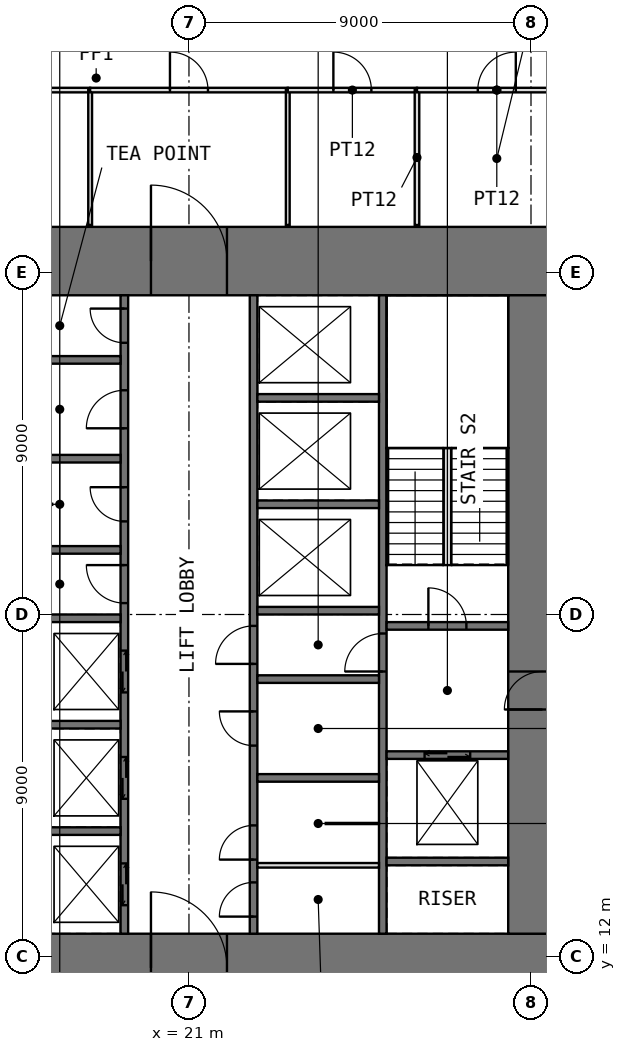
"""IFC4 building model, lengths in metres.
Left out: names, types, materials, properties, quantities, classifications, styles, units other than length and angle.
Written with IfcOpenShell. Run it as: python <this file> out.ifc"""

import sys

from ifc_helpers import new_model, si_unit, direction, frame, frame_2d, origin, place, context, subcontext, project, spatial, rectangle, extrude, element, fill, save


model = new_model("IFC4")
c1 = context("Model", 3, precision=1e-05, world=origin(), true_north=direction((0.0, 1.0)))
c2 = subcontext(c1, "Body", "Model", "MODEL_VIEW")
j1 = project(units=[si_unit("LENGTHUNIT", "METRE"), si_unit("PLANEANGLEUNIT", "RADIAN")], contexts=[c1])
p1 = place(None, origin())
s1 = spatial("IfcSite", under=j1, at=p1, CompositionType="ELEMENT")
p2 = place(p1, origin())
s2 = spatial("IfcBuilding", under=s1, at=p2, CompositionType="ELEMENT")
p3 = place(p2, frame((0.0, 0.0, 26.5)))
s3 = spatial("IfcBuildingStorey", under=s2, at=p3, CompositionType="ELEMENT", Elevation=26.5)
p4 = place(p3, frame((10.8, 11.7, -0.05), z_axis=(0.0, 0.0, 1.0), x_axis=(1.0, 0.0, 0.0)))
e1 = element("IfcWall", 1, at=p4, inside=s3, PredefinedType="SHEAR", context=c2, shape_type="SweptSolid", body=[
    extrude(rectangle(XDim=20.4, YDim=1.8, at=frame_2d((10.2, 0.0))), origin(), (0.0, 0.0, 1.0), 4.0),
])
p5 = place(p4, frame((9.2, 0.0, 0.05)))
e2 = element("IfcOpeningElement", 2, at=p5, cuts=e1, PredefinedType="OPENING", context=c2, shape_type="SweptSolid", body=[
    extrude(rectangle(XDim=2.0, YDim=2.2, at=frame_2d((1.0, 1.1))), frame((0.0, 0.91, 0.0), z_axis=(0.0, -1.0, 0.0), x_axis=(1.0, 0.0, 0.0)), (0.0, 0.0, 1.0), 1.82),
])
p6 = place(p3, frame((10.8, 30.3, -0.05), z_axis=(0.0, 0.0, 1.0), x_axis=(1.0, 0.0, 0.0)))
e3 = element("IfcWall", 3, at=p6, inside=s3, PredefinedType="SHEAR", context=c2, shape_type="SweptSolid", body=[
    extrude(rectangle(XDim=20.4, YDim=1.8, at=frame_2d((10.2, 0.0))), origin(), (0.0, 0.0, 1.0), 4.0),
])
p7 = place(p6, frame((9.2, 0.0, 0.05)))
e4 = element("IfcOpeningElement", 4, at=p7, cuts=e3, PredefinedType="OPENING", context=c2, shape_type="SweptSolid", body=[
    extrude(rectangle(XDim=2.0, YDim=2.2, at=frame_2d((1.0, 1.1))), frame((0.0, 0.91, 0.0), z_axis=(0.0, -1.0, 0.0), x_axis=(1.0, 0.0, 0.0)), (0.0, 0.0, 1.0), 1.82),
])
p8 = place(p3, frame((30.3, 12.6, -0.05), z_axis=(0.0, 0.0, 1.0), x_axis=(0.0, 1.0, 0.0)))
e5 = element("IfcWall", 5, at=p8, inside=s3, PredefinedType="SHEAR", context=c2, shape_type="SweptSolid", body=[
    extrude(rectangle(XDim=16.8, YDim=1.8, at=frame_2d((8.4, 0.0))), origin(), (0.0, 0.0, 1.0), 4.0),
])
p9 = place(p8, frame((5.9, 0.0, 0.05)))
e6 = element("IfcOpeningElement", 6, at=p9, cuts=e5, PredefinedType="OPENING", context=c2, shape_type="SweptSolid", body=[
    extrude(rectangle(XDim=1.0, YDim=2.2, at=frame_2d((0.5, 1.1))), frame((0.0, 0.91, 0.0), z_axis=(0.0, -1.0, 0.0), x_axis=(1.0, 0.0, 0.0)), (0.0, 0.0, 1.0), 1.82),
])
p10 = place(p3, frame((19.3, 12.6, -0.05), z_axis=(0.0, 0.0, 1.0), x_axis=(0.0, 1.0, 0.0)))
e7 = element("IfcWall", 7, at=p10, inside=s3, PredefinedType="SHEAR", context=c2, shape_type="SweptSolid", body=[
    extrude(rectangle(XDim=16.8, YDim=0.2, at=frame_2d((8.4, 0.0))), origin(), (0.0, 0.0, 1.0), 4.0),
])
p11 = place(p10, frame((8.7, 0.0, 0.05)))
e8 = element("IfcOpeningElement", 8, at=p11, cuts=e7, PredefinedType="OPENING", context=c2, shape_type="SweptSolid", body=[
    extrude(rectangle(XDim=1.0, YDim=2.2, at=frame_2d((0.5, 1.1))), frame((0.0, 0.11, 0.0), z_axis=(0.0, -1.0, 0.0), x_axis=(1.0, 0.0, 0.0)), (0.0, 0.0, 1.0), 0.22),
])
p12 = place(p10, frame((10.85, 0.0, 0.05)))
e9 = element("IfcOpeningElement", 9, at=p12, cuts=e7, PredefinedType="OPENING", context=c2, shape_type="SweptSolid", body=[
    extrude(rectangle(XDim=0.9, YDim=2.2, at=frame_2d((0.45, 1.1))), frame((0.0, 0.11, 0.0), z_axis=(0.0, -1.0, 0.0), x_axis=(1.0, 0.0, 0.0)), (0.0, 0.0, 1.0), 0.22),
])
p13 = place(p10, frame((13.3, 0.0, 0.05)))
e10 = element("IfcOpeningElement", 10, at=p13, cuts=e7, PredefinedType="OPENING", context=c2, shape_type="SweptSolid", body=[
    extrude(rectangle(XDim=1.0, YDim=2.2, at=frame_2d((0.5, 1.1))), frame((0.0, 0.11, 0.0), z_axis=(0.0, -1.0, 0.0), x_axis=(1.0, 0.0, 0.0)), (0.0, 0.0, 1.0), 0.22),
])
p14 = place(p10, frame((15.55, 0.0, 0.05)))
e11 = element("IfcOpeningElement", 11, at=p14, cuts=e7, PredefinedType="OPENING", context=c2, shape_type="SweptSolid", body=[
    extrude(rectangle(XDim=0.9, YDim=2.2, at=frame_2d((0.45, 1.1))), frame((0.0, 0.11, 0.0), z_axis=(0.0, -1.0, 0.0), x_axis=(1.0, 0.0, 0.0)), (0.0, 0.0, 1.0), 0.22),
])
p15 = place(p10, frame((0.75, 0.0, 0.05)))
e12 = element("IfcOpeningElement", 12, at=p15, cuts=e7, PredefinedType="OPENING", context=c2, shape_type="SweptSolid", body=[
    extrude(rectangle(XDim=1.1, YDim=2.2, at=frame_2d((0.55, 1.1))), frame((0.0, 0.11, 0.0), z_axis=(0.0, -1.0, 0.0), x_axis=(1.0, 0.0, 0.0)), (0.0, 0.0, 1.0), 0.22),
])
p16 = place(p10, frame((3.55, 0.0, 0.05)))
e13 = element("IfcOpeningElement", 13, at=p16, cuts=e7, PredefinedType="OPENING", context=c2, shape_type="SweptSolid", body=[
    extrude(rectangle(XDim=1.1, YDim=2.2, at=frame_2d((0.55, 1.1))), frame((0.0, 0.11, 0.0), z_axis=(0.0, -1.0, 0.0), x_axis=(1.0, 0.0, 0.0)), (0.0, 0.0, 1.0), 0.22),
])
p17 = place(p10, frame((6.35, 0.0, 0.05)))
e14 = element("IfcOpeningElement", 14, at=p17, cuts=e7, PredefinedType="OPENING", context=c2, shape_type="SweptSolid", body=[
    extrude(rectangle(XDim=1.1, YDim=2.2, at=frame_2d((0.55, 1.1))), frame((0.0, 0.11, 0.0), z_axis=(0.0, -1.0, 0.0), x_axis=(1.0, 0.0, 0.0)), (0.0, 0.0, 1.0), 0.22),
])
p18 = place(p3, frame((22.7, 12.6, -0.05), z_axis=(0.0, 0.0, 1.0), x_axis=(0.0, 1.0, 0.0)))
e15 = element("IfcWall", 15, at=p18, inside=s3, PredefinedType="SHEAR", context=c2, shape_type="SweptSolid", body=[
    extrude(rectangle(XDim=16.8, YDim=0.2, at=frame_2d((8.4, 0.0))), origin(), (0.0, 0.0, 1.0), 4.0),
])
p19 = place(p18, frame((0.45, 0.0, 0.05)))
e16 = element("IfcOpeningElement", 16, at=p19, cuts=e15, PredefinedType="OPENING", context=c2, shape_type="SweptSolid", body=[
    extrude(rectangle(XDim=0.9, YDim=2.2, at=frame_2d((0.45, 1.1))), frame((0.0, 0.11, 0.0), z_axis=(0.0, -1.0, 0.0), x_axis=(1.0, 0.0, 0.0)), (0.0, 0.0, 1.0), 0.22),
])
p20 = place(p18, frame((7.1, 0.0, 0.05)))
e17 = element("IfcOpeningElement", 17, at=p20, cuts=e15, PredefinedType="OPENING", context=c2, shape_type="SweptSolid", body=[
    extrude(rectangle(XDim=1.0, YDim=2.2, at=frame_2d((0.5, 1.1))), frame((0.0, 0.11, 0.0), z_axis=(0.0, -1.0, 0.0), x_axis=(1.0, 0.0, 0.0)), (0.0, 0.0, 1.0), 0.22),
])
p21 = place(p18, frame((1.95, 0.0, 0.05)))
e18 = element("IfcOpeningElement", 18, at=p21, cuts=e15, PredefinedType="OPENING", context=c2, shape_type="SweptSolid", body=[
    extrude(rectangle(XDim=0.9, YDim=2.2, at=frame_2d((0.45, 1.1))), frame((0.0, 0.11, 0.0), z_axis=(0.0, -1.0, 0.0), x_axis=(1.0, 0.0, 0.0)), (0.0, 0.0, 1.0), 0.22),
])
p22 = place(p18, frame((4.95, 0.0, 0.05)))
e19 = element("IfcOpeningElement", 19, at=p22, cuts=e15, PredefinedType="OPENING", context=c2, shape_type="SweptSolid", body=[
    extrude(rectangle(XDim=0.9, YDim=2.2, at=frame_2d((0.45, 1.1))), frame((0.0, 0.11, 0.0), z_axis=(0.0, -1.0, 0.0), x_axis=(1.0, 0.0, 0.0)), (0.0, 0.0, 1.0), 0.22),
])
p23 = place(p3, frame((26.1, 12.6, -0.05), z_axis=(0.0, 0.0, 1.0), x_axis=(0.0, 1.0, 0.0)))
e20 = element("IfcWall", 20, at=p23, inside=s3, PredefinedType="SHEAR", context=c2, shape_type="SweptSolid", body=[
    extrude(rectangle(XDim=16.8, YDim=0.2, at=frame_2d((8.4, 0.0))), origin(), (0.0, 0.0, 1.0), 4.0),
])
p24 = place(p23, frame((6.9, 0.0, 0.05)))
e21 = element("IfcOpeningElement", 21, at=p24, cuts=e20, PredefinedType="OPENING", context=c2, shape_type="SweptSolid", body=[
    extrude(rectangle(XDim=1.0, YDim=2.2, at=frame_2d((0.5, 1.1))), frame((0.0, 0.11, 0.0), z_axis=(0.0, -1.0, 0.0), x_axis=(1.0, 0.0, 0.0)), (0.0, 0.0, 1.0), 0.22),
])
for number, where, z_axis, x_axis in (
    (22, (16.0, 15.3, -0.05), (0.0, 0.0, 1.0), (1.0, 0.0, 0.0)),
    (23, (16.0, 18.1, -0.05), (0.0, 0.0, 1.0), (1.0, 0.0, 0.0)),
    (24, (16.0, 20.9, -0.05), (0.0, 0.0, 1.0), (1.0, 0.0, 0.0)),
    (25, (16.0, 22.7, -0.05), (0.0, 0.0, 1.0), (1.0, 0.0, 0.0)),
    (26, (16.0, 25.1, -0.05), (0.0, 0.0, 1.0), (1.0, 0.0, 0.0)),
    (27, (16.0, 27.7, -0.05), (0.0, 0.0, 1.0), (1.0, 0.0, 0.0)),
    (28, (22.8, 16.7, -0.05), (0.0, 0.0, 1.0), (1.0, 0.0, 0.0)),
    (29, (22.8, 19.3, -0.05), (0.0, 0.0, 1.0), (1.0, 0.0, 0.0)),
    (30, (22.8, 21.1, -0.05), (0.0, 0.0, 1.0), (1.0, 0.0, 0.0)),
    (31, (22.8, 23.9, -0.05), (0.0, 0.0, 1.0), (1.0, 0.0, 0.0)),
    (32, (22.8, 26.7, -0.05), (0.0, 0.0, 1.0), (1.0, 0.0, 0.0)),
    (33, (26.2, 14.5, -0.05), (0.0, 0.0, 1.0), (1.0, 0.0, 0.0)),
):
    element("IfcWall", number, at=place(p3, frame(where, z_axis=z_axis, x_axis=x_axis)), inside=s3, PredefinedType="SHEAR", context=c2, shape_type="SweptSolid", body=[
        extrude(rectangle(XDim=3.2, YDim=0.2, at=frame_2d((1.6, 0.0))), origin(), (0.0, 0.0, 1.0), 4.0),
    ])
p25 = place(p3, frame((26.2, 17.3, -0.05), z_axis=(0.0, 0.0, 1.0), x_axis=(1.0, 0.0, 0.0)))
e34 = element("IfcWall", 34, at=p25, inside=s3, PredefinedType="SHEAR", context=c2, shape_type="SweptSolid", body=[
    extrude(rectangle(XDim=3.2, YDim=0.2, at=frame_2d((1.6, 0.0))), origin(), (0.0, 0.0, 1.0), 4.0),
])
p26 = place(p25, frame((1.0, 0.0, 0.05)))
e35 = element("IfcOpeningElement", 35, at=p26, cuts=e34, PredefinedType="OPENING", context=c2, shape_type="SweptSolid", body=[
    extrude(rectangle(XDim=1.2, YDim=2.2, at=frame_2d((0.6, 1.1))), frame((0.0, 0.11, 0.0), z_axis=(0.0, -1.0, 0.0), x_axis=(1.0, 0.0, 0.0)), (0.0, 0.0, 1.0), 0.22),
])
p27 = place(p3, frame((26.2, 20.7, -0.05), z_axis=(0.0, 0.0, 1.0), x_axis=(1.0, 0.0, 0.0)))
e36 = element("IfcWall", 36, at=p27, inside=s3, PredefinedType="SHEAR", context=c2, shape_type="SweptSolid", body=[
    extrude(rectangle(XDim=3.2, YDim=0.2, at=frame_2d((1.6, 0.0))), origin(), (0.0, 0.0, 1.0), 4.0),
])
p28 = place(p27, frame((1.1, 0.0, 0.05)))
e37 = element("IfcOpeningElement", 37, at=p28, cuts=e36, PredefinedType="OPENING", context=c2, shape_type="SweptSolid", body=[
    extrude(rectangle(XDim=1.0, YDim=2.2, at=frame_2d((0.5, 1.1))), frame((0.0, 0.11, 0.0), z_axis=(0.0, -1.0, 0.0), x_axis=(1.0, 0.0, 0.0)), (0.0, 0.0, 1.0), 0.22),
])
p29 = place(p3, frame((22.8, 14.4, 0.0), z_axis=(0.0, 0.0, 1.0), x_axis=(1.0, 0.0, 0.0)))
e38 = element("IfcWall", 38, at=p29, inside=s3, PredefinedType="PARTITIONING", context=c2, shape_type="SweptSolid", body=[
    extrude(rectangle(XDim=3.2, YDim=0.12, at=frame_2d((1.6, 0.0))), origin(), (0.0, 0.0, 1.0), 3.75),
])
p30 = place(p3, frame((24.6, 15.5, 0.0), z_axis=(0.0, 0.0, 1.0), x_axis=(1.0, 0.0, 0.0)))
e39 = element("IfcWall", 39, at=p30, inside=s3, PredefinedType="PARTITIONING", context=c2, shape_type="SweptSolid", body=[
    extrude(rectangle(XDim=1.4, YDim=0.03, at=frame_2d((0.7, 0.0))), origin(), (0.0, 0.0, 1.0), 3.75),
])
p31 = place(p3, frame((14.6, 34.8, 0.0), z_axis=(0.0, 0.0, 1.0), x_axis=(1.0, 0.0, 0.0)))
e40 = element("IfcWall", 40, at=p31, inside=s3, PredefinedType="PARTITIONING", context=c2, shape_type="SweptSolid", body=[
    extrude(rectangle(XDim=3.8, YDim=0.12, at=frame_2d((1.9, 0.0))), origin(), (0.0, 0.0, 1.0), 3.75),
])
p32 = place(p31, frame((1.4, 0.0, 0.0)))
e41 = element("IfcOpeningElement", 41, at=p32, cuts=e40, PredefinedType="OPENING", context=c2, shape_type="SweptSolid", body=[
    extrude(rectangle(XDim=1.0, YDim=2.4, at=frame_2d((0.5, 1.2))), frame((0.0, 0.07, 0.0), z_axis=(0.0, -1.0, 0.0), x_axis=(1.0, 0.0, 0.0)), (0.0, 0.0, 1.0), 0.14),
])
p33 = place(p3, frame((18.4, 31.25, 0.0), z_axis=(0.0, 0.0, 1.0), x_axis=(0.0, 1.0, 0.0)))
e42 = element("IfcWall", 42, at=p33, inside=s3, PredefinedType="PARTITIONING", context=c2, shape_type="SweptSolid", body=[
    extrude(rectangle(XDim=3.55, YDim=0.1, at=frame_2d((1.775, 0.0))), origin(), (0.0, 0.0, 1.0), 3.75),
])
p34 = place(p3, frame((18.4, 34.8, 0.0), z_axis=(0.0, 0.0, 1.0), x_axis=(1.0, 0.0, 0.0)))
e43 = element("IfcWall", 43, at=p34, inside=s3, PredefinedType="PARTITIONING", context=c2, shape_type="SweptSolid", body=[
    extrude(rectangle(XDim=5.2, YDim=0.12, at=frame_2d((2.6, 0.0))), origin(), (0.0, 0.0, 1.0), 3.75),
])
p35 = place(p34, frame((2.1, 0.0, 0.0)))
e44 = element("IfcOpeningElement", 44, at=p35, cuts=e43, PredefinedType="OPENING", context=c2, shape_type="SweptSolid", body=[
    extrude(rectangle(XDim=1.0, YDim=2.4, at=frame_2d((0.5, 1.2))), frame((0.0, 0.07, 0.0), z_axis=(0.0, -1.0, 0.0), x_axis=(1.0, 0.0, 0.0)), (0.0, 0.0, 1.0), 0.14),
])
p36 = place(p3, frame((23.6, 31.25, 0.0), z_axis=(0.0, 0.0, 1.0), x_axis=(0.0, 1.0, 0.0)))
e45 = element("IfcWall", 45, at=p36, inside=s3, PredefinedType="PARTITIONING", context=c2, shape_type="SweptSolid", body=[
    extrude(rectangle(XDim=3.55, YDim=0.1, at=frame_2d((1.775, 0.0))), origin(), (0.0, 0.0, 1.0), 3.75),
])
p37 = place(p3, frame((23.6, 34.8, 0.0), z_axis=(0.0, 0.0, 1.0), x_axis=(1.0, 0.0, 0.0)))
e46 = element("IfcWall", 46, at=p37, inside=s3, PredefinedType="PARTITIONING", context=c2, shape_type="SweptSolid", body=[
    extrude(rectangle(XDim=3.4, YDim=0.12, at=frame_2d((1.7, 0.0))), origin(), (0.0, 0.0, 1.0), 3.75),
])
p38 = place(p37, frame((1.2, 0.0, 0.0)))
e47 = element("IfcOpeningElement", 47, at=p38, cuts=e46, PredefinedType="OPENING", context=c2, shape_type="SweptSolid", body=[
    extrude(rectangle(XDim=1.0, YDim=2.4, at=frame_2d((0.5, 1.2))), frame((0.0, 0.07, 0.0), z_axis=(0.0, -1.0, 0.0), x_axis=(1.0, 0.0, 0.0)), (0.0, 0.0, 1.0), 0.14),
])
p39 = place(p3, frame((27.0, 31.25, 0.0), z_axis=(0.0, 0.0, 1.0), x_axis=(0.0, 1.0, 0.0)))
e48 = element("IfcWall", 48, at=p39, inside=s3, PredefinedType="PARTITIONING", context=c2, shape_type="SweptSolid", body=[
    extrude(rectangle(XDim=3.55, YDim=0.12, at=frame_2d((1.775, 0.0))), origin(), (0.0, 0.0, 1.0), 3.75),
])
p40 = place(p3, frame((27.0, 34.8, 0.0), z_axis=(0.0, 0.0, 1.0), x_axis=(1.0, 0.0, 0.0)))
e49 = element("IfcWall", 49, at=p40, inside=s3, PredefinedType="PARTITIONING", context=c2, shape_type="SweptSolid", body=[
    extrude(rectangle(XDim=4.2, YDim=0.12, at=frame_2d((2.1, 0.0))), origin(), (0.0, 0.0, 1.0), 3.75),
])
p41 = place(p40, frame((1.6, 0.0, 0.0)))
e50 = element("IfcOpeningElement", 50, at=p41, cuts=e49, PredefinedType="OPENING", context=c2, shape_type="SweptSolid", body=[
    extrude(rectangle(XDim=1.0, YDim=2.4, at=frame_2d((0.5, 1.2))), frame((0.0, 0.07, 0.0), z_axis=(0.0, -1.0, 0.0), x_axis=(1.0, 0.0, 0.0)), (0.0, 0.0, 1.0), 0.14),
])
p42 = place(p3, frame((27.8, 22.3, 0.0), z_axis=(0.0, 0.0, 1.0), x_axis=(0.0, 1.0, 0.0)))
e51 = element("IfcWall", 51, at=p42, inside=s3, PredefinedType="PARTITIONING", context=c2, shape_type="SweptSolid", body=[
    extrude(rectangle(XDim=3.08, YDim=0.2, at=frame_2d((1.54, 0.0))), origin(), (0.0, 0.0, 1.0), 4.0),
])
p43 = place(p5, origin())
e52 = element("IfcDoor", 52, at=p43, inside=s3, OperationType="DOUBLE_DOOR_SINGLE_SWING", PredefinedType="DOOR", context=c2, shape_type="SweptSolid", body=[
    extrude(rectangle(XDim=2.0, YDim=2.2, at=frame_2d((1.0, 1.1))), frame((0.0, 0.025, 0.0), z_axis=(0.0, -1.0, 0.0), x_axis=(1.0, 0.0, 0.0)), (0.0, 0.0, 1.0), 0.05),
])
fill(e2, e52)
p44 = place(p7, origin())
e53 = element("IfcDoor", 53, at=p44, inside=s3, OperationType="DOUBLE_DOOR_SINGLE_SWING", PredefinedType="DOOR", context=c2, shape_type="SweptSolid", body=[
    extrude(rectangle(XDim=2.0, YDim=2.2, at=frame_2d((1.0, 1.1))), frame((0.0, 0.025, 0.0), z_axis=(0.0, -1.0, 0.0), x_axis=(1.0, 0.0, 0.0)), (0.0, 0.0, 1.0), 0.05),
])
fill(e4, e53)
p45 = place(p19, origin())
e54 = element("IfcDoor", 54, at=p45, inside=s3, OperationType="SINGLE_SWING_LEFT", PredefinedType="DOOR", context=c2, shape_type="SweptSolid", body=[
    extrude(rectangle(XDim=0.9, YDim=2.2, at=frame_2d((0.45, 1.1))), frame((0.0, 0.025, 0.0), z_axis=(0.0, -1.0, 0.0), x_axis=(1.0, 0.0, 0.0)), (0.0, 0.0, 1.0), 0.05),
])
fill(e16, e54)
p46 = place(p9, origin())
e55 = element("IfcDoor", 55, at=p46, inside=s3, OperationType="SINGLE_SWING_LEFT", PredefinedType="DOOR", context=c2, shape_type="SweptSolid", body=[
    extrude(rectangle(XDim=1.0, YDim=2.2, at=frame_2d((0.5, 1.1))), frame((0.0, 0.025, 0.0), z_axis=(0.0, -1.0, 0.0), x_axis=(1.0, 0.0, 0.0)), (0.0, 0.0, 1.0), 0.05),
])
fill(e6, e55)
p47 = place(p28, origin())
e56 = element("IfcDoor", 56, at=p47, inside=s3, OperationType="SINGLE_SWING_LEFT", PredefinedType="DOOR", context=c2, shape_type="SweptSolid", body=[
    extrude(rectangle(XDim=1.0, YDim=2.2, at=frame_2d((0.5, 1.1))), frame((0.0, 0.025, 0.0), z_axis=(0.0, -1.0, 0.0), x_axis=(1.0, 0.0, 0.0)), (0.0, 0.0, 1.0), 0.05),
])
fill(e37, e56)
p48 = place(p24, origin())
e57 = element("IfcDoor", 57, at=p48, inside=s3, OperationType="SINGLE_SWING_LEFT", PredefinedType="DOOR", context=c2, shape_type="SweptSolid", body=[
    extrude(rectangle(XDim=1.0, YDim=2.2, at=frame_2d((0.5, 1.1))), frame((0.0, 0.025, 0.0), z_axis=(0.0, -1.0, 0.0), x_axis=(1.0, 0.0, 0.0)), (0.0, 0.0, 1.0), 0.05),
])
fill(e21, e57)
p49 = place(p11, origin())
e58 = element("IfcDoor", 58, at=p49, inside=s3, OperationType="SINGLE_SWING_RIGHT", PredefinedType="DOOR", context=c2, shape_type="SweptSolid", body=[
    extrude(rectangle(XDim=1.0, YDim=2.2, at=frame_2d((0.5, 1.1))), frame((0.0, 0.025, 0.0), z_axis=(0.0, -1.0, 0.0), x_axis=(1.0, 0.0, 0.0)), (0.0, 0.0, 1.0), 0.05),
])
fill(e8, e58)
p50 = place(p20, origin())
e59 = element("IfcDoor", 59, at=p50, inside=s3, OperationType="SINGLE_SWING_LEFT", PredefinedType="DOOR", context=c2, shape_type="SweptSolid", body=[
    extrude(rectangle(XDim=1.0, YDim=2.2, at=frame_2d((0.5, 1.1))), frame((0.0, 0.025, 0.0), z_axis=(0.0, -1.0, 0.0), x_axis=(1.0, 0.0, 0.0)), (0.0, 0.0, 1.0), 0.05),
])
fill(e17, e59)
p51 = place(p12, origin())
e60 = element("IfcDoor", 60, at=p51, inside=s3, OperationType="SINGLE_SWING_RIGHT", PredefinedType="DOOR", context=c2, shape_type="SweptSolid", body=[
    extrude(rectangle(XDim=0.9, YDim=2.2, at=frame_2d((0.45, 1.1))), frame((0.0, 0.025, 0.0), z_axis=(0.0, -1.0, 0.0), x_axis=(1.0, 0.0, 0.0)), (0.0, 0.0, 1.0), 0.05),
])
fill(e9, e60)
p52 = place(p13, origin())
e61 = element("IfcDoor", 61, at=p52, inside=s3, OperationType="SINGLE_SWING_LEFT", PredefinedType="DOOR", context=c2, shape_type="SweptSolid", body=[
    extrude(rectangle(XDim=1.0, YDim=2.2, at=frame_2d((0.5, 1.1))), frame((0.0, 0.025, 0.0), z_axis=(0.0, -1.0, 0.0), x_axis=(1.0, 0.0, 0.0)), (0.0, 0.0, 1.0), 0.05),
])
fill(e10, e61)
p53 = place(p14, origin())
e62 = element("IfcDoor", 62, at=p53, inside=s3, OperationType="SINGLE_SWING_RIGHT", PredefinedType="DOOR", context=c2, shape_type="SweptSolid", body=[
    extrude(rectangle(XDim=0.9, YDim=2.2, at=frame_2d((0.45, 1.1))), frame((0.0, 0.025, 0.0), z_axis=(0.0, -1.0, 0.0), x_axis=(1.0, 0.0, 0.0)), (0.0, 0.0, 1.0), 0.05),
])
fill(e11, e62)
p54 = place(p21, origin())
e63 = element("IfcDoor", 63, at=p54, inside=s3, OperationType="SINGLE_SWING_LEFT", PredefinedType="DOOR", context=c2, shape_type="SweptSolid", body=[
    extrude(rectangle(XDim=0.9, YDim=2.2, at=frame_2d((0.45, 1.1))), frame((0.0, 0.025, 0.0), z_axis=(0.0, -1.0, 0.0), x_axis=(1.0, 0.0, 0.0)), (0.0, 0.0, 1.0), 0.05),
])
fill(e18, e63)
p55 = place(p22, origin())
e64 = element("IfcDoor", 64, at=p55, inside=s3, OperationType="SINGLE_SWING_RIGHT", PredefinedType="DOOR", context=c2, shape_type="SweptSolid", body=[
    extrude(rectangle(XDim=0.9, YDim=2.2, at=frame_2d((0.45, 1.1))), frame((0.0, 0.025, 0.0), z_axis=(0.0, -1.0, 0.0), x_axis=(1.0, 0.0, 0.0)), (0.0, 0.0, 1.0), 0.05),
])
fill(e19, e64)
p56 = place(p38, origin())
e65 = element("IfcDoor", 65, at=p56, inside=s3, OperationType="SINGLE_SWING_LEFT", PredefinedType="DOOR", context=c2, shape_type="SweptSolid", body=[
    extrude(rectangle(XDim=1.0, YDim=2.4, at=frame_2d((0.5, 1.2))), frame((0.0, 0.025, 0.0), z_axis=(0.0, -1.0, 0.0), x_axis=(1.0, 0.0, 0.0)), (0.0, 0.0, 1.0), 0.05),
])
fill(e47, e65)
p57 = place(p41, origin())
e66 = element("IfcDoor", 66, at=p57, inside=s3, OperationType="SINGLE_SWING_RIGHT", PredefinedType="DOOR", context=c2, shape_type="SweptSolid", body=[
    extrude(rectangle(XDim=1.0, YDim=2.4, at=frame_2d((0.5, 1.2))), frame((0.0, 0.025, 0.0), z_axis=(0.0, -1.0, 0.0), x_axis=(1.0, 0.0, 0.0)), (0.0, 0.0, 1.0), 0.05),
])
fill(e50, e66)
p58 = place(p35, origin())
e67 = element("IfcDoor", 67, at=p58, inside=s3, OperationType="SINGLE_SWING_LEFT", PredefinedType="DOOR", context=c2, shape_type="SweptSolid", body=[
    extrude(rectangle(XDim=1.0, YDim=2.4, at=frame_2d((0.5, 1.2))), frame((0.0, 0.025, 0.0), z_axis=(0.0, -1.0, 0.0), x_axis=(1.0, 0.0, 0.0)), (0.0, 0.0, 1.0), 0.05),
])
fill(e44, e67)
p59 = place(p15, origin())
e68 = element("IfcDoor", 68, at=p59, inside=s3, OperationType="DOUBLE_DOOR_SLIDING", PredefinedType="DOOR", context=c2, shape_type="SweptSolid", body=[
    extrude(rectangle(XDim=1.1, YDim=2.2, at=frame_2d((0.55, 1.1))), frame((0.0, 0.025, 0.0), z_axis=(0.0, -1.0, 0.0), x_axis=(1.0, 0.0, 0.0)), (0.0, 0.0, 1.0), 0.05),
])
fill(e12, e68)
p60 = place(p16, origin())
e69 = element("IfcDoor", 69, at=p60, inside=s3, OperationType="DOUBLE_DOOR_SLIDING", PredefinedType="DOOR", context=c2, shape_type="SweptSolid", body=[
    extrude(rectangle(XDim=1.1, YDim=2.2, at=frame_2d((0.55, 1.1))), frame((0.0, 0.025, 0.0), z_axis=(0.0, -1.0, 0.0), x_axis=(1.0, 0.0, 0.0)), (0.0, 0.0, 1.0), 0.05),
])
fill(e13, e69)
p61 = place(p17, origin())
e70 = element("IfcDoor", 70, at=p61, inside=s3, OperationType="DOUBLE_DOOR_SLIDING", PredefinedType="DOOR", context=c2, shape_type="SweptSolid", body=[
    extrude(rectangle(XDim=1.1, YDim=2.2, at=frame_2d((0.55, 1.1))), frame((0.0, 0.025, 0.0), z_axis=(0.0, -1.0, 0.0), x_axis=(1.0, 0.0, 0.0)), (0.0, 0.0, 1.0), 0.05),
])
fill(e14, e70)
p62 = place(p26, origin())
e71 = element("IfcDoor", 71, at=p62, inside=s3, OperationType="DOUBLE_DOOR_SLIDING", PredefinedType="DOOR", context=c2, shape_type="SweptSolid", body=[
    extrude(rectangle(XDim=1.2, YDim=2.2, at=frame_2d((0.6, 1.1))), frame((0.0, 0.025, 0.0), z_axis=(0.0, -1.0, 0.0), x_axis=(1.0, 0.0, 0.0)), (0.0, 0.0, 1.0), 0.05),
])
fill(e35, e71)
save(model, sys.argv[1])
